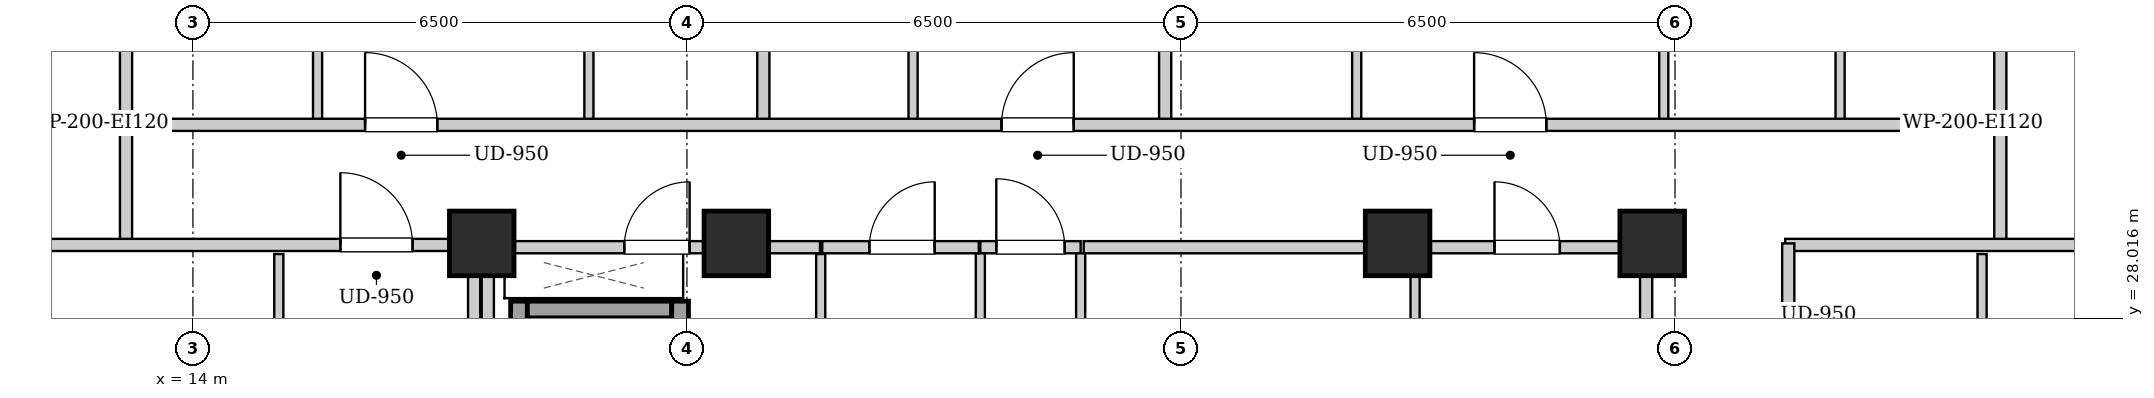
"""IFC4 building model, lengths in metres.
Left out: names, types, materials, properties, quantities, classifications, styles, units other than length and angle.
Written with IfcOpenShell. Run it as: python <this file> out.ifc"""

import sys

from ifc_helpers import new_model, si_unit, direction, frame, frame_2d, origin, origin_2d, place, context, subcontext, project, spatial, rectangle, extrude, element, fill, save


model = new_model("IFC4")
c1 = context("Model", 3, precision=1e-05, world=origin(), true_north=direction((0.0, 1.0)))
c2 = subcontext(c1, "Body", "Model", "MODEL_VIEW")
j1 = project(units=[si_unit("LENGTHUNIT", "METRE"), si_unit("PLANEANGLEUNIT", "RADIAN")], contexts=[c1])
p1 = place(None, origin())
s1 = spatial("IfcSite", under=j1, at=p1, CompositionType="ELEMENT")
p2 = place(p1, origin())
s2 = spatial("IfcBuilding", under=s1, at=p2, CompositionType="ELEMENT")
p3 = place(p2, frame((0.0, 0.0, 187.6)))
s3 = spatial("IfcBuildingStorey", under=s2, at=p3, CompositionType="ELEMENT", Elevation=187.6)
for number, where, z_axis, x_axis in (
    (1, (17.8, 29.0, 0.0), (0.0, 0.0, 1.0), (1.0, 0.0, 0.0)),
    (2, (21.15, 29.0, 0.0), (0.0, 0.0, 1.0), (1.0, 0.0, 0.0)),
    (3, (29.85, 29.0, 0.0), (0.0, 0.0, 1.0), (1.0, 0.0, 0.0)),
    (4, (33.2, 29.0, 0.0), (0.0, 0.0, 1.0), (1.0, 0.0, 0.0)),
):
    element("IfcColumn", number, at=place(p3, frame(where, z_axis=z_axis, x_axis=x_axis)), inside=s3, PredefinedType="COLUMN", context=c2, shape_type="SweptSolid", body=[
        extrude(rectangle(XDim=0.85, YDim=0.85, at=origin_2d()), origin(), (0.0, 0.0, 1.0), 3.3),
    ])
p4 = place(p3, frame((18.29, 24.1, 0.0), z_axis=(0.0, 0.0, 1.0), x_axis=(0.0, 1.0, 0.0)))
e5 = element("IfcWall", 5, at=p4, inside=s3, PredefinedType="SHEAR", context=c2, shape_type="SweptSolid", body=[
    extrude(rectangle(XDim=4.14, YDim=0.22, at=frame_2d((2.07, 0.0))), origin(), (0.0, 0.0, 1.0), 3.04),
])
p5 = place(p3, frame((18.4, 28.13, 0.0), z_axis=(0.0, 0.0, 1.0), x_axis=(1.0, 0.0, 0.0)))
e6 = element("IfcWall", 6, at=p5, inside=s3, PredefinedType="SHEAR", context=c2, shape_type="SweptSolid", body=[
    extrude(rectangle(XDim=1.9, YDim=0.22, at=frame_2d((0.95, 0.0))), origin(), (0.0, 0.0, 1.0), 3.04),
])
p6 = place(p3, frame((20.41, 26.06, 0.0), z_axis=(0.0, 0.0, 1.0), x_axis=(0.0, 1.0, 0.0)))
e7 = element("IfcWall", 7, at=p6, inside=s3, PredefinedType="SHEAR", context=c2, shape_type="SweptSolid", body=[
    extrude(rectangle(XDim=2.18, YDim=0.22, at=frame_2d((1.09, 0.0))), origin(), (0.0, 0.0, 1.0), 3.04),
])
p7 = place(p6, frame((0.54, 0.0, 0.0)))
e8 = element("IfcOpeningElement", 8, at=p7, cuts=e7, PredefinedType="OPENING", context=c2, shape_type="SweptSolid", body=[
    extrude(rectangle(XDim=1.1, YDim=2.15, at=frame_2d((0.55, 1.075))), frame((0.0, 0.12, 0.0), z_axis=(0.0, -1.0, 0.0), x_axis=(1.0, 0.0, 0.0)), (0.0, 0.0, 1.0), 0.24),
])
for number, where, z_axis, x_axis in (
    (9, (17.88, 24.12, 0.0), (0.0, 0.0, 1.0), (0.0, 1.0, 0.0)),
    (10, (33.12, 24.12, 0.0), (0.0, 0.0, 1.0), (0.0, 1.0, 0.0)),
):
    element("IfcWall", number, at=place(p3, frame(where, z_axis=z_axis, x_axis=x_axis)), inside=s3, PredefinedType="PARTITIONING", context=c2, shape_type="SweptSolid", body=[
        extrude(rectangle(XDim=4.76, YDim=0.16, at=frame_2d((2.38, 0.0))), origin(), (0.0, 0.0, 1.0), 2.375),
    ])
p8 = place(p3, frame((24.36, 28.95, 0.0), z_axis=(0.0, 0.0, 1.0), x_axis=(1.0, 0.0, 0.0)))
e11 = element("IfcWall", 11, at=p8, inside=s3, PredefinedType="PARTITIONING", context=c2, shape_type="SweptSolid", body=[
    extrude(rectangle(XDim=1.32, YDim=0.16, at=frame_2d((0.66, 0.0))), origin(), (0.0, 0.0, 1.0), 2.556),
])
p9 = place(p8, frame((0.21, 0.0, 0.0)))
e12 = element("IfcOpeningElement", 12, at=p9, cuts=e11, PredefinedType="OPENING", context=c2, shape_type="SweptSolid", body=[
    extrude(rectangle(XDim=0.9, YDim=2.05, at=frame_2d((0.45, 1.025))), frame((0.0, 0.09, 0.0), z_axis=(0.0, -1.0, 0.0), x_axis=(1.0, 0.0, 0.0)), (0.0, 0.0, 1.0), 0.18),
])
p10 = place(p3, frame((17.96, 28.95, 0.0), z_axis=(0.0, 0.0, 1.0), x_axis=(1.0, 0.0, 0.0)))
e13 = element("IfcWall", 13, at=p10, inside=s3, PredefinedType="PARTITIONING", context=c2, shape_type="SweptSolid", body=[
    extrude(rectangle(XDim=4.29, YDim=0.16, at=frame_2d((2.145, 0.0))), origin(), (0.0, 0.0, 1.0), 2.556),
])
p11 = place(p10, frame((1.715, 0.0, 0.0)))
e14 = element("IfcOpeningElement", 14, at=p11, cuts=e13, PredefinedType="OPENING", context=c2, shape_type="SweptSolid", body=[
    extrude(rectangle(XDim=0.86, YDim=2.05, at=frame_2d((0.43, 1.025))), frame((0.0, 0.09, 0.0), z_axis=(0.0, -1.0, 0.0), x_axis=(1.0, 0.0, 0.0)), (0.0, 0.0, 1.0), 0.18),
])
for number, where, z_axis, x_axis in (
    (15, (24.36, 25.0, 0.0), (0.0, 0.0, 1.0), (0.0, 1.0, 0.0)),
    (16, (25.68, 25.0, 0.0), (0.0, 0.0, 1.0), (0.0, 1.0, 0.0)),
):
    element("IfcWall", number, at=place(p3, frame(where, z_axis=z_axis, x_axis=x_axis)), inside=s3, PredefinedType="PARTITIONING", context=c2, shape_type="SweptSolid", body=[
        extrude(rectangle(XDim=3.87, YDim=0.12, at=frame_2d((1.935, 0.0))), origin(), (0.0, 0.0, 1.0), 3.04),
    ])
p12 = place(p3, frame((30.08, 26.18, 0.0), z_axis=(0.0, 0.0, 1.0), x_axis=(0.0, 1.0, 0.0)))
e17 = element("IfcWall", 17, at=p12, inside=s3, PredefinedType="PARTITIONING", context=c2, shape_type="SweptSolid", body=[
    extrude(rectangle(XDim=2.68, YDim=0.12, at=frame_2d((1.34, 0.0))), origin(), (0.0, 0.0, 1.0), 3.04),
])
p13 = place(p3, frame((30.08, 28.95, 0.0), z_axis=(0.0, 0.0, 1.0), x_axis=(1.0, 0.0, 0.0)))
e18 = element("IfcWall", 18, at=p13, inside=s3, PredefinedType="PARTITIONING", context=c2, shape_type="SweptSolid", body=[
    extrude(rectangle(XDim=2.96, YDim=0.16, at=frame_2d((1.48, 0.0))), origin(), (0.0, 0.0, 1.0), 3.04),
])
p14 = place(p13, frame((1.045, 0.0, 0.0)))
e19 = element("IfcOpeningElement", 19, at=p14, cuts=e18, PredefinedType="OPENING", context=c2, shape_type="SweptSolid", body=[
    extrude(rectangle(XDim=0.86, YDim=2.05, at=frame_2d((0.43, 1.025))), frame((0.0, 0.09, 0.0), z_axis=(0.0, -1.0, 0.0), x_axis=(1.0, 0.0, 0.0)), (0.0, 0.0, 1.0), 0.18),
])
p15 = place(p3, frame((22.26, 25.0, 0.0), z_axis=(0.0, 0.0, 1.0), x_axis=(0.0, 1.0, 0.0)))
e20 = element("IfcWall", 20, at=p15, inside=s3, PredefinedType="PARTITIONING", context=c2, shape_type="SweptSolid", body=[
    extrude(rectangle(XDim=3.86, YDim=0.12, at=frame_2d((1.93, 0.0))), origin(), (0.0, 0.0, 1.0), 3.04),
])
p16 = place(p3, frame((22.28, 28.95, 0.0), z_axis=(0.0, 0.0, 1.0), x_axis=(1.0, 0.0, 0.0)))
e21 = element("IfcWall", 21, at=p16, inside=s3, PredefinedType="PARTITIONING", context=c2, shape_type="SweptSolid", body=[
    extrude(rectangle(XDim=2.06, YDim=0.16, at=frame_2d((1.03, 0.0))), origin(), (0.0, 0.0, 1.0), 2.556),
])
p17 = place(p16, frame((0.62, 0.0, 0.0)))
e22 = element("IfcOpeningElement", 22, at=p17, cuts=e21, PredefinedType="OPENING", context=c2, shape_type="SweptSolid", body=[
    extrude(rectangle(XDim=0.86, YDim=2.05, at=frame_2d((0.43, 1.025))), frame((0.0, 0.09, 0.0), z_axis=(0.0, -1.0, 0.0), x_axis=(1.0, 0.0, 0.0)), (0.0, 0.0, 1.0), 0.18),
])
p18 = place(p3, frame((25.72, 28.95, 0.0), z_axis=(0.0, 0.0, 1.0), x_axis=(1.0, 0.0, 0.0)))
e23 = element("IfcWall", 23, at=p18, inside=s3, PredefinedType="PARTITIONING", context=c2, shape_type="SweptSolid", body=[
    extrude(rectangle(XDim=4.32, YDim=0.16, at=frame_2d((2.16, 0.0))), origin(), (0.0, 0.0, 1.0), 2.556),
])
for number, where, z_axis, x_axis in (
    (24, (13.12, 28.98, 0.0), (0.0, 0.0, 1.0), (0.0, 1.0, 0.0)),
    (25, (37.78, 28.98, 0.0), (0.0, 0.0, 1.0), (0.0, 1.0, 0.0)),
):
    element("IfcWall", number, at=place(p3, frame(where, z_axis=z_axis, x_axis=x_axis)), inside=s3, PredefinedType="PARTITIONING", context=c2, shape_type="SweptSolid", body=[
        extrude(rectangle(XDim=1.58, YDim=0.16, at=frame_2d((0.79, 0.0))), origin(), (0.0, 0.0, 1.0), 3.04),
    ])
p19 = place(p3, frame((34.95, 28.98, 0.0), z_axis=(0.0, 0.0, 1.0), x_axis=(1.0, 0.0, 0.0)))
e26 = element("IfcWall", 26, at=p19, inside=s3, PredefinedType="PARTITIONING", context=c2, shape_type="SweptSolid", body=[
    extrude(rectangle(XDim=5.07, YDim=0.16, at=frame_2d((2.535, 0.0))), origin(), (0.0, 0.0, 1.0), 2.556),
])
p20 = place(p3, frame((13.12, 30.6, 0.0), z_axis=(0.0, 0.0, 1.0), x_axis=(0.0, 1.0, 0.0)))
e27 = element("IfcWall", 27, at=p20, inside=s3, PredefinedType="PARTITIONING", context=c2, shape_type="SweptSolid", body=[
    extrude(rectangle(XDim=2.91, YDim=0.16, at=frame_2d((1.455, 0.0))), origin(), (0.0, 0.0, 1.0), 3.04),
])
p21 = place(p3, frame((15.64, 30.6, 0.0), z_axis=(0.0, 0.0, 1.0), x_axis=(0.0, 1.0, 0.0)))
e28 = element("IfcWall", 28, at=p21, inside=s3, PredefinedType="PARTITIONING", context=c2, shape_type="SweptSolid", body=[
    extrude(rectangle(XDim=2.85, YDim=0.12, at=frame_2d((1.425, 0.0))), origin(), (0.0, 0.0, 1.0), 3.04),
])
p22 = place(p21, frame((0.995, 0.0, 0.0)))
e29 = element("IfcOpeningElement", 29, at=p22, cuts=e28, PredefinedType="OPENING", context=c2, shape_type="SweptSolid", body=[
    extrude(rectangle(XDim=0.86, YDim=2.05, at=frame_2d((0.43, 1.025))), frame((0.0, 0.07, 0.0), z_axis=(0.0, -1.0, 0.0), x_axis=(1.0, 0.0, 0.0)), (0.0, 0.0, 1.0), 0.14),
])
p23 = place(p3, frame((19.21, 30.6, 0.0), z_axis=(0.0, 0.0, 1.0), x_axis=(0.0, 1.0, 0.0)))
e30 = element("IfcWall", 30, at=p23, inside=s3, PredefinedType="PARTITIONING", context=c2, shape_type="SweptSolid", body=[
    extrude(rectangle(XDim=2.85, YDim=0.12, at=frame_2d((1.425, 0.0))), origin(), (0.0, 0.0, 1.0), 3.04),
])
p24 = place(p23, frame((0.975, 0.0, 0.0)))
e31 = element("IfcOpeningElement", 31, at=p24, cuts=e30, PredefinedType="OPENING", context=c2, shape_type="SweptSolid", body=[
    extrude(rectangle(XDim=0.9, YDim=2.05, at=frame_2d((0.45, 1.025))), frame((0.0, 0.07, 0.0), z_axis=(0.0, -1.0, 0.0), x_axis=(1.0, 0.0, 0.0)), (0.0, 0.0, 1.0), 0.14),
])
p25 = place(p3, frame((21.505, 30.6, 0.0), z_axis=(0.0, 0.0, 1.0), x_axis=(0.0, 1.0, 0.0)))
e32 = element("IfcWall", 32, at=p25, inside=s3, PredefinedType="PARTITIONING", context=c2, shape_type="SweptSolid", body=[
    extrude(rectangle(XDim=9.32, YDim=0.16, at=frame_2d((4.66, 0.0))), origin(), (0.0, 0.0, 1.0), 3.04),
])
p26 = place(p3, frame((23.475, 30.6, 0.0), z_axis=(0.0, 0.0, 1.0), x_axis=(0.0, 1.0, 0.0)))
e33 = element("IfcWall", 33, at=p26, inside=s3, PredefinedType="PARTITIONING", context=c2, shape_type="SweptSolid", body=[
    extrude(rectangle(XDim=2.85, YDim=0.12, at=frame_2d((1.425, 0.0))), origin(), (0.0, 0.0, 1.0), 3.04),
])
p27 = place(p26, frame((0.995, 0.0, 0.0)))
e34 = element("IfcOpeningElement", 34, at=p27, cuts=e33, PredefinedType="OPENING", context=c2, shape_type="SweptSolid", body=[
    extrude(rectangle(XDim=0.86, YDim=2.05, at=frame_2d((0.43, 1.025))), frame((0.0, 0.07, 0.0), z_axis=(0.0, -1.0, 0.0), x_axis=(1.0, 0.0, 0.0)), (0.0, 0.0, 1.0), 0.14),
])
p28 = place(p3, frame((37.78, 30.6, 0.0), z_axis=(0.0, 0.0, 1.0), x_axis=(0.0, 1.0, 0.0)))
e35 = element("IfcWall", 35, at=p28, inside=s3, PredefinedType="PARTITIONING", context=c2, shape_type="SweptSolid", body=[
    extrude(rectangle(XDim=2.91, YDim=0.16, at=frame_2d((1.455, 0.0))), origin(), (0.0, 0.0, 1.0), 3.04),
])
p29 = place(p3, frame((26.792, 30.6, 0.0), z_axis=(0.0, 0.0, 1.0), x_axis=(0.0, 1.0, 0.0)))
e36 = element("IfcWall", 36, at=p29, inside=s3, PredefinedType="PARTITIONING", context=c2, shape_type="SweptSolid", body=[
    extrude(rectangle(XDim=9.32, YDim=0.16, at=frame_2d((4.66, 0.0))), origin(), (0.0, 0.0, 1.0), 3.04),
])
p30 = place(p3, frame((29.312, 30.6, 0.0), z_axis=(0.0, 0.0, 1.0), x_axis=(0.0, 1.0, 0.0)))
e37 = element("IfcWall", 37, at=p30, inside=s3, PredefinedType="PARTITIONING", context=c2, shape_type="SweptSolid", body=[
    extrude(rectangle(XDim=2.85, YDim=0.12, at=frame_2d((1.425, 0.0))), origin(), (0.0, 0.0, 1.0), 3.04),
])
p31 = place(p30, frame((0.995, 0.0, 0.0)))
e38 = element("IfcOpeningElement", 38, at=p31, cuts=e37, PredefinedType="OPENING", context=c2, shape_type="SweptSolid", body=[
    extrude(rectangle(XDim=0.86, YDim=2.05, at=frame_2d((0.43, 1.025))), frame((0.0, 0.07, 0.0), z_axis=(0.0, -1.0, 0.0), x_axis=(1.0, 0.0, 0.0)), (0.0, 0.0, 1.0), 0.14),
])
p32 = place(p3, frame((33.352, 30.6, 0.0), z_axis=(0.0, 0.0, 1.0), x_axis=(0.0, 1.0, 0.0)))
e39 = element("IfcWall", 39, at=p32, inside=s3, PredefinedType="PARTITIONING", context=c2, shape_type="SweptSolid", body=[
    extrude(rectangle(XDim=2.85, YDim=0.12, at=frame_2d((1.425, 0.0))), origin(), (0.0, 0.0, 1.0), 3.04),
])
p33 = place(p32, frame((0.975, 0.0, 0.0)))
e40 = element("IfcOpeningElement", 40, at=p33, cuts=e39, PredefinedType="OPENING", context=c2, shape_type="SweptSolid", body=[
    extrude(rectangle(XDim=0.9, YDim=2.05, at=frame_2d((0.45, 1.025))), frame((0.0, 0.07, 0.0), z_axis=(0.0, -1.0, 0.0), x_axis=(1.0, 0.0, 0.0)), (0.0, 0.0, 1.0), 0.14),
])
p34 = place(p3, frame((35.672, 30.6, 0.0), z_axis=(0.0, 0.0, 1.0), x_axis=(0.0, 1.0, 0.0)))
e41 = element("IfcWall", 41, at=p34, inside=s3, PredefinedType="PARTITIONING", context=c2, shape_type="SweptSolid", body=[
    extrude(rectangle(XDim=2.85, YDim=0.12, at=frame_2d((1.425, 0.0))), origin(), (0.0, 0.0, 1.0), 3.04),
])
p35 = place(p34, frame((0.975, 0.0, 0.0)))
e42 = element("IfcOpeningElement", 42, at=p35, cuts=e41, PredefinedType="OPENING", context=c2, shape_type="SweptSolid", body=[
    extrude(rectangle(XDim=0.9, YDim=2.05, at=frame_2d((0.45, 1.025))), frame((0.0, 0.07, 0.0), z_axis=(0.0, -1.0, 0.0), x_axis=(1.0, 0.0, 0.0)), (0.0, 0.0, 1.0), 0.14),
])
p36 = place(p3, frame((10.88, 28.98, 0.0), z_axis=(0.0, 0.0, 1.0), x_axis=(1.0, 0.0, 0.0)))
e43 = element("IfcWall", 43, at=p36, inside=s3, PredefinedType="PARTITIONING", context=c2, shape_type="SweptSolid", body=[
    extrude(rectangle(XDim=6.88, YDim=0.16, at=frame_2d((3.44, 0.0))), origin(), (0.0, 0.0, 1.0), 2.556),
])
p37 = place(p36, frame((5.06, 0.0, 0.0)))
e44 = element("IfcOpeningElement", 44, at=p37, cuts=e43, PredefinedType="OPENING", context=c2, shape_type="SweptSolid", body=[
    extrude(rectangle(XDim=0.95, YDim=2.1, at=frame_2d((0.475, 1.05))), frame((0.0, 0.09, 0.0), z_axis=(0.0, -1.0, 0.0), x_axis=(1.0, 0.0, 0.0)), (0.0, 0.0, 1.0), 0.18),
])
p38 = place(p3, frame((15.13, 25.052, 0.0), z_axis=(0.0, 0.0, 1.0), x_axis=(0.0, 1.0, 0.0)))
e45 = element("IfcWall", 45, at=p38, inside=s3, PredefinedType="PARTITIONING", context=c2, shape_type="SweptSolid", body=[
    extrude(rectangle(XDim=3.808, YDim=0.12, at=frame_2d((1.904, 0.0))), origin(), (0.0, 0.0, 1.0), 3.04),
])
p39 = place(p38, frame((1.454, 0.0, 0.0)))
e46 = element("IfcOpeningElement", 46, at=p39, cuts=e45, PredefinedType="OPENING", context=c2, shape_type="SweptSolid", body=[
    extrude(rectangle(XDim=0.9, YDim=2.05, at=frame_2d((0.45, 1.025))), frame((0.0, 0.07, 0.0), z_axis=(0.0, -1.0, 0.0), x_axis=(1.0, 0.0, 0.0)), (0.0, 0.0, 1.0), 0.14),
])
p40 = place(p3, frame((37.54, 25.052, 0.0), z_axis=(0.0, 0.0, 1.0), x_axis=(0.0, 1.0, 0.0)))
e47 = element("IfcWall", 47, at=p40, inside=s3, PredefinedType="PARTITIONING", context=c2, shape_type="SweptSolid", body=[
    extrude(rectangle(XDim=3.808, YDim=0.12, at=frame_2d((1.904, 0.0))), origin(), (0.0, 0.0, 1.0), 3.04),
])
p41 = place(p40, frame((1.454, 0.0, 0.0)))
e48 = element("IfcOpeningElement", 48, at=p41, cuts=e47, PredefinedType="OPENING", context=c2, shape_type="SweptSolid", body=[
    extrude(rectangle(XDim=0.9, YDim=2.05, at=frame_2d((0.45, 1.025))), frame((0.0, 0.07, 0.0), z_axis=(0.0, -1.0, 0.0), x_axis=(1.0, 0.0, 0.0)), (0.0, 0.0, 1.0), 0.14),
])
p42 = place(p3, frame((13.15, 30.56, 0.0), z_axis=(0.0, 0.0, 1.0), x_axis=(1.0, 0.0, 0.0)))
e49 = element("IfcWall", 49, at=p42, inside=s3, PredefinedType="PARTITIONING", context=c2, shape_type="SweptSolid", body=[
    extrude(rectangle(XDim=24.6, YDim=0.16, at=frame_2d((12.3, 0.0))), origin(), (0.0, 0.0, 1.0), 3.04),
])
p43 = place(p42, frame((3.115, 0.0, 0.0)))
e50 = element("IfcOpeningElement", 50, at=p43, cuts=e49, PredefinedType="OPENING", context=c2, shape_type="SweptSolid", body=[
    extrude(rectangle(XDim=0.95, YDim=2.1, at=frame_2d((0.475, 1.05))), frame((0.0, 0.09, 0.0), z_axis=(0.0, -1.0, 0.0), x_axis=(1.0, 0.0, 0.0)), (0.0, 0.0, 1.0), 0.18),
])
p44 = place(p42, frame((11.489, 0.0, 0.0)))
e51 = element("IfcOpeningElement", 51, at=p44, cuts=e49, PredefinedType="OPENING", context=c2, shape_type="SweptSolid", body=[
    extrude(rectangle(XDim=0.95, YDim=2.1, at=frame_2d((0.475, 1.05))), frame((0.0, 0.09, 0.0), z_axis=(0.0, -1.0, 0.0), x_axis=(1.0, 0.0, 0.0)), (0.0, 0.0, 1.0), 0.18),
])
p45 = place(p42, frame((17.707, 0.0, 0.0)))
e52 = element("IfcOpeningElement", 52, at=p45, cuts=e49, PredefinedType="OPENING", context=c2, shape_type="SweptSolid", body=[
    extrude(rectangle(XDim=0.95, YDim=2.1, at=frame_2d((0.475, 1.05))), frame((0.0, 0.09, 0.0), z_axis=(0.0, -1.0, 0.0), x_axis=(1.0, 0.0, 0.0)), (0.0, 0.0, 1.0), 0.18),
])
p46 = place(p3, frame((17.7, 15.02, 0.0), z_axis=(0.0, 0.0, 1.0), x_axis=(0.0, 1.0, 0.0)))
e53 = element("IfcWall", 53, at=p46, inside=s3, PredefinedType="PARTITIONING", context=c2, shape_type="SweptSolid", body=[
    extrude(rectangle(XDim=13.98, YDim=0.16, at=frame_2d((6.99, 0.0))), origin(), (0.0, 0.0, 1.0), 2.375),
])
p47 = place(p3, frame((34.99, 15.07, 0.0), z_axis=(0.0, 0.0, 1.0), x_axis=(0.0, 1.0, 0.0)))
e54 = element("IfcWall", 54, at=p47, inside=s3, PredefinedType="PARTITIONING", context=c2, shape_type="SweptSolid", body=[
    extrude(rectangle(XDim=13.93, YDim=0.16, at=frame_2d((6.965, 0.0))), origin(), (0.0, 0.0, 1.0), 3.04),
])
p48 = place(p47, frame((4.661, 0.0, 0.0)))
e55 = element("IfcOpeningElement", 55, at=p48, cuts=e54, PredefinedType="OPENING", context=c2, shape_type="SweptSolid", body=[
    extrude(rectangle(XDim=0.95, YDim=2.1, at=frame_2d((0.475, 1.05))), frame((0.0, 0.09, 0.0), z_axis=(0.0, -1.0, 0.0), x_axis=(1.0, 0.0, 0.0)), (0.0, 0.0, 1.0), 0.18),
])
p49 = place(p47, frame((11.411, 0.0, 0.0)))
e56 = element("IfcOpeningElement", 56, at=p49, cuts=e54, PredefinedType="OPENING", context=c2, shape_type="SweptSolid", body=[
    extrude(rectangle(XDim=0.95, YDim=2.1, at=frame_2d((0.475, 1.05))), frame((0.0, 0.09, 0.0), z_axis=(0.0, -1.0, 0.0), x_axis=(1.0, 0.0, 0.0)), (0.0, 0.0, 1.0), 0.18),
])
p50 = place(p9, origin())
e57 = element("IfcDoor", 57, at=p50, inside=s3, OperationType="SINGLE_SWING_LEFT", PredefinedType="DOOR", context=c2, shape_type="SweptSolid", body=[
    extrude(rectangle(XDim=0.9, YDim=2.05, at=frame_2d((0.45, 1.025))), frame((0.0, 0.025, 0.0), z_axis=(0.0, -1.0, 0.0), x_axis=(1.0, 0.0, 0.0)), (0.0, 0.0, 1.0), 0.05),
])
fill(e12, e57)
p51 = place(p11, origin())
e58 = element("IfcDoor", 58, at=p51, inside=s3, OperationType="SINGLE_SWING_RIGHT", PredefinedType="DOOR", context=c2, shape_type="SweptSolid", body=[
    extrude(rectangle(XDim=0.86, YDim=2.05, at=frame_2d((0.43, 1.025))), frame((0.0, 0.025, 0.0), z_axis=(0.0, -1.0, 0.0), x_axis=(1.0, 0.0, 0.0)), (0.0, 0.0, 1.0), 0.05),
])
fill(e14, e58)
p52 = place(p14, origin())
e59 = element("IfcDoor", 59, at=p52, inside=s3, OperationType="SINGLE_SWING_LEFT", PredefinedType="DOOR", context=c2, shape_type="SweptSolid", body=[
    extrude(rectangle(XDim=0.86, YDim=2.05, at=frame_2d((0.43, 1.025))), frame((0.0, 0.025, 0.0), z_axis=(0.0, -1.0, 0.0), x_axis=(1.0, 0.0, 0.0)), (0.0, 0.0, 1.0), 0.05),
])
fill(e19, e59)
p53 = place(p17, origin())
e60 = element("IfcDoor", 60, at=p53, inside=s3, OperationType="SINGLE_SWING_RIGHT", PredefinedType="DOOR", context=c2, shape_type="SweptSolid", body=[
    extrude(rectangle(XDim=0.86, YDim=2.05, at=frame_2d((0.43, 1.025))), frame((0.0, 0.025, 0.0), z_axis=(0.0, -1.0, 0.0), x_axis=(1.0, 0.0, 0.0)), (0.0, 0.0, 1.0), 0.05),
])
fill(e22, e60)
p54 = place(p37, origin())
e61 = element("IfcDoor", 61, at=p54, inside=s3, OperationType="SINGLE_SWING_LEFT", PredefinedType="DOOR", context=c2, shape_type="SweptSolid", body=[
    extrude(rectangle(XDim=0.95, YDim=2.1, at=frame_2d((0.475, 1.05))), frame((0.0, 0.025, 0.0), z_axis=(0.0, -1.0, 0.0), x_axis=(1.0, 0.0, 0.0)), (0.0, 0.0, 1.0), 0.05),
])
fill(e44, e61)
p55 = place(p43, origin())
e62 = element("IfcDoor", 62, at=p55, inside=s3, OperationType="SINGLE_SWING_LEFT", PredefinedType="DOOR", context=c2, shape_type="SweptSolid", body=[
    extrude(rectangle(XDim=0.95, YDim=2.1, at=frame_2d((0.475, 1.05))), frame((0.0, 0.025, 0.0), z_axis=(0.0, -1.0, 0.0), x_axis=(1.0, 0.0, 0.0)), (0.0, 0.0, 1.0), 0.05),
])
fill(e50, e62)
p56 = place(p44, origin())
e63 = element("IfcDoor", 63, at=p56, inside=s3, OperationType="SINGLE_SWING_RIGHT", PredefinedType="DOOR", context=c2, shape_type="SweptSolid", body=[
    extrude(rectangle(XDim=0.95, YDim=2.1, at=frame_2d((0.475, 1.05))), frame((0.0, 0.025, 0.0), z_axis=(0.0, -1.0, 0.0), x_axis=(1.0, 0.0, 0.0)), (0.0, 0.0, 1.0), 0.05),
])
fill(e51, e63)
p57 = place(p45, origin())
e64 = element("IfcDoor", 64, at=p57, inside=s3, OperationType="SINGLE_SWING_LEFT", PredefinedType="DOOR", context=c2, shape_type="SweptSolid", body=[
    extrude(rectangle(XDim=0.95, YDim=2.1, at=frame_2d((0.475, 1.05))), frame((0.0, 0.025, 0.0), z_axis=(0.0, -1.0, 0.0), x_axis=(1.0, 0.0, 0.0)), (0.0, 0.0, 1.0), 0.05),
])
fill(e52, e64)
save(model, sys.argv[1])
